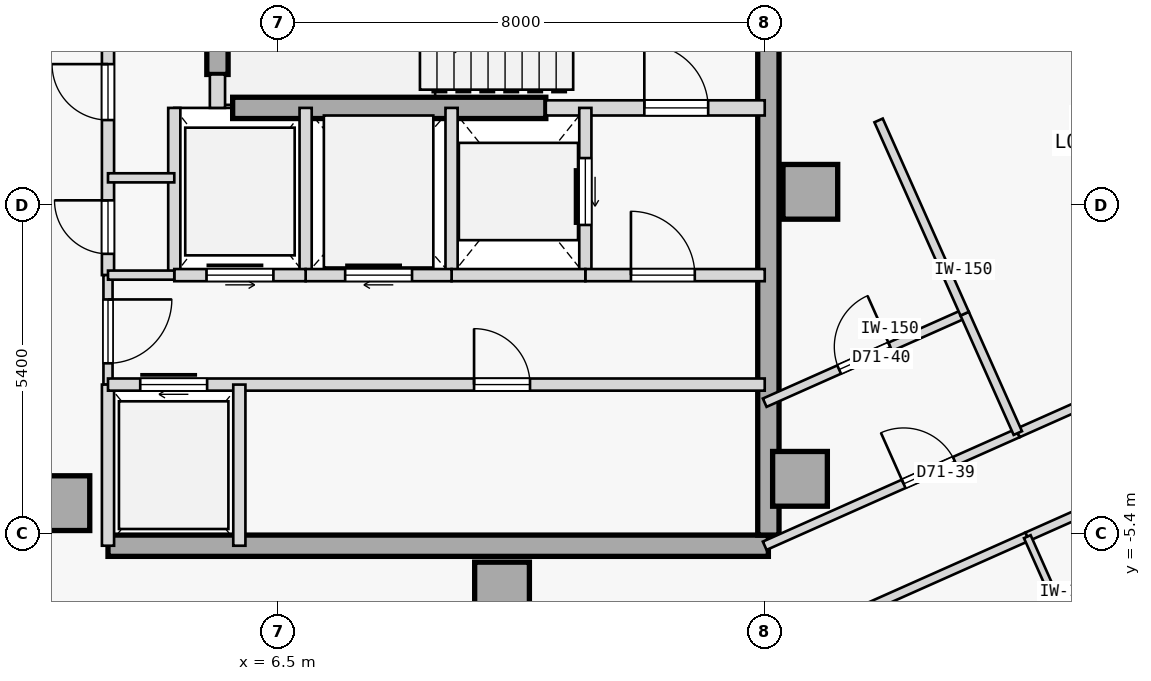
"""IFC4 building model, lengths in metres.
Left out: names, types, materials, properties, quantities, classifications, styles, units other than length and angle.
Written with IfcOpenShell. Run it as: python <this file> out.ifc"""

import sys

from ifc_helpers import new_model, si_unit, direction, frame, frame_2d, origin, origin_2d, place, context, subcontext, project, spatial, rectangle, extrude, element, fill, save


model = new_model("IFC4")
c1 = context("Model", 3, precision=1e-05, world=origin(), true_north=direction((0.0, 1.0)))
c2 = subcontext(c1, "Body", "Model", "MODEL_VIEW")
j1 = project(units=[si_unit("LENGTHUNIT", "METRE"), si_unit("PLANEANGLEUNIT", "RADIAN")], contexts=[c1])
p1 = place(None, origin())
s1 = spatial("IfcSite", under=j1, at=p1, CompositionType="ELEMENT")
p2 = place(p1, origin())
s2 = spatial("IfcBuilding", under=s1, at=p2, CompositionType="ELEMENT")
p3 = place(p2, frame((0.0, 0.0, 265.55)))
s3 = spatial("IfcBuildingStorey", under=s2, at=p3, CompositionType="ELEMENT", Elevation=265.55)
for number, where, z_axis, x_axis in (
    (1, (15.25, 0.22, 0.0), (0.0, 0.0, 1.0), (1.0, 0.0, 0.0)),
    (2, (15.08, -4.5, 0.0), (0.0, 0.0, 1.0), (1.0, 0.0, 0.0)),
    (3, (10.18, -6.32, 0.0), (0.0, 0.0, 1.0), (1.0, 0.0, 0.0)),
    (4, (2.95, -4.9, 0.0), (0.0, 0.0, 1.0), (1.0, 0.0, 0.0)),
):
    element("IfcColumn", number, at=place(p3, frame(where, z_axis=z_axis, x_axis=x_axis)), inside=s3, PredefinedType="COLUMN", context=c2, shape_type="SweptSolid", body=[
        extrude(rectangle(XDim=0.9, YDim=0.9, at=origin_2d()), origin(), (0.0, 0.0, 1.0), 3.35),
    ])
p4 = place(p3, frame((3.7, -5.6, 0.0), z_axis=(0.0, 0.0, 1.0), x_axis=(1.0, 0.0, 0.0)))
e5 = element("IfcWall", 5, at=p4, inside=s3, PredefinedType="SHEAR", context=c2, shape_type="SweptSolid", body=[
    extrude(rectangle(XDim=10.86, YDim=0.35, at=frame_2d((5.43, 0.0))), origin(), (0.0, 0.0, 1.0), 3.125),
])
p5 = place(p3, frame((14.56, -5.425, 0.0), z_axis=(0.0, 0.0, 1.0), x_axis=(0.0, 1.0, 0.0)))
e6 = element("IfcWall", 6, at=p5, inside=s3, PredefinedType="SHEAR", context=c2, shape_type="SweptSolid", body=[
    extrude(rectangle(XDim=10.85, YDim=0.35, at=frame_2d((5.425, 0.0))), origin(), (0.0, 0.0, 1.0), 3.125),
])
p6 = place(p3, frame((5.5, 2.15, 0.0), z_axis=(0.0, 0.0, 1.0), x_axis=(0.0, 1.0, 0.0)))
e7 = element("IfcWall", 7, at=p6, inside=s3, PredefinedType="SHEAR", context=c2, shape_type="SweptSolid", body=[
    extrude(rectangle(XDim=3.275, YDim=0.35, at=frame_2d((1.638, 0.0))), origin(), (0.0, 0.0, 1.0), 3.125),
])
p7 = place(p3, frame((5.75, 1.6, 0.0), z_axis=(0.0, 0.0, 1.0), x_axis=(1.0, 0.0, 0.0)))
e8 = element("IfcWall", 8, at=p7, inside=s3, PredefinedType="SHEAR", context=c2, shape_type="SweptSolid", body=[
    extrude(rectangle(XDim=5.15, YDim=0.35, at=frame_2d((2.575, 0.0))), origin(), (0.0, 0.0, 1.0), 3.125),
])
p8 = place(p3, frame((10.9, 1.6, 0.0), z_axis=(0.0, 0.0, 1.0), x_axis=(1.0, 0.0, 0.0)))
e9 = element("IfcWall", 9, at=p8, inside=s3, PredefinedType="STANDARD", context=c2, shape_type="SweptSolid", body=[
    extrude(rectangle(XDim=3.6, YDim=0.25, at=frame_2d((1.8, 0.0))), origin(), (0.0, 0.0, 1.0), 3.125),
])
p9 = place(p8, frame((1.62, 0.0, 0.0)))
e10 = element("IfcOpeningElement", 10, at=p9, cuts=e9, PredefinedType="OPENING", context=c2, shape_type="SweptSolid", body=[
    extrude(rectangle(XDim=1.05, YDim=2.15, at=frame_2d((0.525, 1.075))), frame((0.0, 0.135, 0.0), z_axis=(0.0, -1.0, 0.0), x_axis=(1.0, 0.0, 0.0)), (0.0, 0.0, 1.0), 0.27),
])
p10 = place(p3, frame((5.5, 1.6, 0.0), z_axis=(0.0, 0.0, 1.0), x_axis=(0.0, 1.0, 0.0)))
e11 = element("IfcWall", 11, at=p10, inside=s3, PredefinedType="STANDARD", context=c2, shape_type="SweptSolid", body=[
    extrude(rectangle(XDim=0.55, YDim=0.25, at=frame_2d((0.275, 0.0))), origin(), (0.0, 0.0, 1.0), 3.125),
])
p11 = place(p3, frame((3.7, -1.15, 0.0), z_axis=(0.0, 0.0, 1.0), x_axis=(0.0, 1.0, 0.0)))
e12 = element("IfcWall", 12, at=p11, inside=s3, PredefinedType="STANDARD", context=c2, shape_type="SweptSolid", body=[
    extrude(rectangle(XDim=6.75, YDim=0.2, at=frame_2d((3.375, 0.0))), origin(), (0.0, 0.0, 1.0), 3.125),
])
p12 = place(p11, frame((0.35, 0.0, 0.0)))
e13 = element("IfcOpeningElement", 13, at=p12, cuts=e12, PredefinedType="OPENING", context=c2, shape_type="SweptSolid", body=[
    extrude(rectangle(XDim=0.88, YDim=2.15, at=frame_2d((0.44, 1.075))), frame((0.0, 0.11, 0.0), z_axis=(0.0, -1.0, 0.0), x_axis=(1.0, 0.0, 0.0)), (0.0, 0.0, 1.0), 0.22),
])
p13 = place(p11, frame((2.55, 0.0, 0.0)))
e14 = element("IfcOpeningElement", 14, at=p13, cuts=e12, PredefinedType="OPENING", context=c2, shape_type="SweptSolid", body=[
    extrude(rectangle(XDim=0.92, YDim=2.15, at=frame_2d((0.46, 1.075))), frame((0.0, 0.11, 0.0), z_axis=(0.0, -1.0, 0.0), x_axis=(1.0, 0.0, 0.0)), (0.0, 0.0, 1.0), 0.22),
])
p14 = place(p11, frame((4.22, 0.0, 0.0)))
e15 = element("IfcOpeningElement", 15, at=p14, cuts=e12, PredefinedType="OPENING", context=c2, shape_type="SweptSolid", body=[
    extrude(rectangle(XDim=0.88, YDim=2.15, at=frame_2d((0.44, 1.075))), frame((0.0, 0.11, 0.0), z_axis=(0.0, -1.0, 0.0), x_axis=(1.0, 0.0, 0.0)), (0.0, 0.0, 1.0), 0.22),
])
p15 = place(p3, frame((3.7, -2.95, 0.0), z_axis=(0.0, 0.0, 1.0), x_axis=(0.0, 1.0, 0.0)))
e16 = element("IfcWall", 16, at=p15, inside=s3, PredefinedType="PARTITIONING", context=c2, shape_type="SweptSolid", body=[
    extrude(rectangle(XDim=1.8, YDim=0.15, at=frame_2d((0.9, 0.0))), origin(), (0.0, 0.0, 1.0), 3.125),
])
p16 = place(p15, frame((0.35, 0.0, 0.0)))
e17 = element("IfcOpeningElement", 17, at=p16, cuts=e16, PredefinedType="OPENING", context=c2, shape_type="SweptSolid", body=[
    extrude(rectangle(XDim=1.05, YDim=2.18, at=frame_2d((0.525, 1.09))), frame((0.0, 0.085, 0.0), z_axis=(0.0, -1.0, 0.0), x_axis=(1.0, 0.0, 0.0)), (0.0, 0.0, 1.0), 0.17),
])
p17 = place(p3, frame((3.7, -5.6, 0.0), z_axis=(0.0, 0.0, 1.0), x_axis=(0.0, 1.0, 0.0)))
e18 = element("IfcWall", 18, at=p17, inside=s3, PredefinedType="STANDARD", context=c2, shape_type="SweptSolid", body=[
    extrude(rectangle(XDim=2.65, YDim=0.2, at=frame_2d((1.325, 0.0))), origin(), (0.0, 0.0, 1.0), 3.125),
])
p18 = place(p3, frame((11.55, -1.15, 0.0), z_axis=(0.0, 0.0, 1.0), x_axis=(0.0, 1.0, 0.0)))
e19 = element("IfcWall", 19, at=p18, inside=s3, PredefinedType="STANDARD", context=c2, shape_type="SweptSolid", body=[
    extrude(rectangle(XDim=2.75, YDim=0.2, at=frame_2d((1.375, 0.0))), origin(), (0.0, 0.0, 1.0), 3.125),
])
p19 = place(p18, frame((0.825, 0.0, 0.0)))
e20 = element("IfcOpeningElement", 20, at=p19, cuts=e19, PredefinedType="OPENING", context=c2, shape_type="SweptSolid", body=[
    extrude(rectangle(XDim=1.1, YDim=2.15, at=frame_2d((0.55, 1.075))), frame((0.0, 0.11, 0.0), z_axis=(0.0, -1.0, 0.0), x_axis=(1.0, 0.0, 0.0)), (0.0, 0.0, 1.0), 0.22),
])
p20 = place(p3, frame((9.35, -1.15, 0.0), z_axis=(0.0, 0.0, 1.0), x_axis=(0.0, 1.0, 0.0)))
e21 = element("IfcWall", 21, at=p20, inside=s3, PredefinedType="STANDARD", context=c2, shape_type="SweptSolid", body=[
    extrude(rectangle(XDim=2.75, YDim=0.2, at=frame_2d((1.375, 0.0))), origin(), (0.0, 0.0, 1.0), 3.125),
])
p21 = place(p3, frame((11.55, -1.15, 0.0), z_axis=(0.0, 0.0, 1.0), x_axis=(1.0, 0.0, 0.0)))
e22 = element("IfcWall", 22, at=p21, inside=s3, PredefinedType="STANDARD", context=c2, shape_type="SweptSolid", body=[
    extrude(rectangle(XDim=2.95, YDim=0.2, at=frame_2d((1.475, 0.0))), origin(), (0.0, 0.0, 1.0), 3.125),
])
p22 = place(p21, frame((0.75, 0.0, 0.0)))
e23 = element("IfcOpeningElement", 23, at=p22, cuts=e22, PredefinedType="OPENING", context=c2, shape_type="SweptSolid", body=[
    extrude(rectangle(XDim=1.05, YDim=2.18, at=frame_2d((0.525, 1.09))), frame((0.0, 0.11, 0.0), z_axis=(0.0, -1.0, 0.0), x_axis=(1.0, 0.0, 0.0)), (0.0, 0.0, 1.0), 0.22),
])
p23 = place(p3, frame((9.35, -1.15, 0.0), z_axis=(0.0, 0.0, 1.0), x_axis=(1.0, 0.0, 0.0)))
e24 = element("IfcWall", 24, at=p23, inside=s3, PredefinedType="STANDARD", context=c2, shape_type="SweptSolid", body=[
    extrude(rectangle(XDim=2.2, YDim=0.2, at=frame_2d((1.1, 0.0))), origin(), (0.0, 0.0, 1.0), 3.125),
])
p24 = place(p3, frame((6.95, -1.15, 0.0), z_axis=(0.0, 0.0, 1.0), x_axis=(0.0, 1.0, 0.0)))
e25 = element("IfcWall", 25, at=p24, inside=s3, PredefinedType="STANDARD", context=c2, shape_type="SweptSolid", body=[
    extrude(rectangle(XDim=2.75, YDim=0.2, at=frame_2d((1.375, 0.0))), origin(), (0.0, 0.0, 1.0), 3.125),
])
p25 = place(p3, frame((6.95, -1.15, 0.0), z_axis=(0.0, 0.0, 1.0), x_axis=(1.0, 0.0, 0.0)))
e26 = element("IfcWall", 26, at=p25, inside=s3, PredefinedType="STANDARD", context=c2, shape_type="SweptSolid", body=[
    extrude(rectangle(XDim=2.4, YDim=0.2, at=frame_2d((1.2, 0.0))), origin(), (0.0, 0.0, 1.0), 3.125),
])
p26 = place(p25, frame((0.65, 0.0, 0.0)))
e27 = element("IfcOpeningElement", 27, at=p26, cuts=e26, PredefinedType="OPENING", context=c2, shape_type="SweptSolid", body=[
    extrude(rectangle(XDim=1.1, YDim=2.15, at=frame_2d((0.55, 1.075))), frame((0.0, 0.11, 0.0), z_axis=(0.0, -1.0, 0.0), x_axis=(1.0, 0.0, 0.0)), (0.0, 0.0, 1.0), 0.22),
])
p27 = place(p3, frame((4.79, -1.15, 0.0), z_axis=(0.0, 0.0, 1.0), x_axis=(0.0, 1.0, 0.0)))
e28 = element("IfcWall", 28, at=p27, inside=s3, PredefinedType="STANDARD", context=c2, shape_type="SweptSolid", body=[
    extrude(rectangle(XDim=2.75, YDim=0.2, at=frame_2d((1.375, 0.0))), origin(), (0.0, 0.0, 1.0), 3.125),
])
p28 = place(p3, frame((4.79, -1.15, 0.0), z_axis=(0.0, 0.0, 1.0), x_axis=(1.0, 0.0, 0.0)))
e29 = element("IfcWall", 29, at=p28, inside=s3, PredefinedType="STANDARD", context=c2, shape_type="SweptSolid", body=[
    extrude(rectangle(XDim=2.16, YDim=0.2, at=frame_2d((1.08, 0.0))), origin(), (0.0, 0.0, 1.0), 3.125),
])
p29 = place(p28, frame((0.53, 0.0, 0.0)))
e30 = element("IfcOpeningElement", 30, at=p29, cuts=e29, PredefinedType="OPENING", context=c2, shape_type="SweptSolid", body=[
    extrude(rectangle(XDim=1.1, YDim=2.15, at=frame_2d((0.55, 1.075))), frame((0.0, 0.11, 0.0), z_axis=(0.0, -1.0, 0.0), x_axis=(1.0, 0.0, 0.0)), (0.0, 0.0, 1.0), 0.22),
])
p30 = place(p3, frame((3.7, -1.15, 0.0), z_axis=(0.0, 0.0, 1.0), x_axis=(1.0, 0.0, 0.0)))
e31 = element("IfcWall", 31, at=p30, inside=s3, PredefinedType="PARTITIONING", context=c2, shape_type="SweptSolid", body=[
    extrude(rectangle(XDim=1.09, YDim=0.15, at=frame_2d((0.545, 0.0))), origin(), (0.0, 0.0, 1.0), 3.125),
])
p31 = place(p3, frame((3.7, -2.95, 0.0), z_axis=(0.0, 0.0, 1.0), x_axis=(1.0, 0.0, 0.0)))
e32 = element("IfcWall", 32, at=p31, inside=s3, PredefinedType="STANDARD", context=c2, shape_type="SweptSolid", body=[
    extrude(rectangle(XDim=10.8, YDim=0.2, at=frame_2d((5.4, 0.0))), origin(), (0.0, 0.0, 1.0), 3.125),
])
p32 = place(p31, frame((0.53, 0.0, 0.0)))
e33 = element("IfcOpeningElement", 33, at=p32, cuts=e32, PredefinedType="OPENING", context=c2, shape_type="SweptSolid", body=[
    extrude(rectangle(XDim=1.1, YDim=2.15, at=frame_2d((0.55, 1.075))), frame((0.0, 0.11, 0.0), z_axis=(0.0, -1.0, 0.0), x_axis=(1.0, 0.0, 0.0)), (0.0, 0.0, 1.0), 0.22),
])
p33 = place(p31, frame((6.02, 0.0, 0.0)))
e34 = element("IfcOpeningElement", 34, at=p33, cuts=e32, PredefinedType="OPENING", context=c2, shape_type="SweptSolid", body=[
    extrude(rectangle(XDim=0.92, YDim=2.15, at=frame_2d((0.46, 1.075))), frame((0.0, 0.11, 0.0), z_axis=(0.0, -1.0, 0.0), x_axis=(1.0, 0.0, 0.0)), (0.0, 0.0, 1.0), 0.22),
])
p34 = place(p3, frame((5.86, -5.6, 0.0), z_axis=(0.0, 0.0, 1.0), x_axis=(0.0, 1.0, 0.0)))
e35 = element("IfcWall", 35, at=p34, inside=s3, PredefinedType="STANDARD", context=c2, shape_type="SweptSolid", body=[
    extrude(rectangle(XDim=2.65, YDim=0.2, at=frame_2d((1.325, 0.0))), origin(), (0.0, 0.0, 1.0), 3.125),
])
p35 = place(p3, frame((3.7, 0.45, 0.0), z_axis=(0.0, 0.0, 1.0), x_axis=(1.0, 0.0, 0.0)))
e36 = element("IfcWall", 36, at=p35, inside=s3, PredefinedType="PARTITIONING", context=c2, shape_type="SweptSolid", body=[
    extrude(rectangle(XDim=1.09, YDim=0.15, at=frame_2d((0.545, 0.0))), origin(), (0.0, 0.0, 1.0), 3.125),
])
p36 = place(p3, frame((14.844, -7.22, 0.0), z_axis=(0.0, 0.0, 1.0), x_axis=(0.913524337797, 0.406784075711, 0.0)))
e37 = element("IfcWall", 37, at=p36, inside=s3, PredefinedType="PARTITIONING", context=c2, shape_type="SweptSolid", body=[
    extrude(rectangle(XDim=4.35, YDim=0.15, at=frame_2d((2.175, 0.0))), origin(), (0.0, 0.0, 1.0), 3.125),
])
p37 = place(p3, frame((18.818, -5.451, 0.0), z_axis=(0.0, 0.0, 1.0), x_axis=(0.913538066796, 0.406753242783, 0.0)))
e38 = element("IfcWall", 38, at=p37, inside=s3, PredefinedType="PARTITIONING", context=c2, shape_type="SweptSolid", body=[
    extrude(rectangle(XDim=3.5, YDim=0.15, at=frame_2d((1.75, 0.0))), origin(), (0.0, 0.0, 1.0), 3.125),
])
p38 = place(p3, frame((14.5, -5.6, 0.0), z_axis=(0.0, 0.0, 1.0), x_axis=(0.913550607208, 0.406725076766, 0.0)))
e39 = element("IfcWall", 39, at=p38, inside=s3, PredefinedType="PARTITIONING", context=c2, shape_type="SweptSolid", body=[
    extrude(rectangle(XDim=4.556, YDim=0.15, at=frame_2d((2.278, 0.0))), origin(), (0.0, 0.0, 1.0), 3.125),
])
p39 = place(p38, frame((2.501, 0.0, 0.0)))
e40 = element("IfcOpeningElement", 40, at=p39, cuts=e39, PredefinedType="OPENING", context=c2, shape_type="SweptSolid", body=[
    extrude(rectangle(XDim=0.92, YDim=2.15, at=frame_2d((0.46, 1.075))), frame((0.0, 0.085, 0.0), z_axis=(0.0, -1.0, 0.0), x_axis=(1.0, 0.0, 0.0)), (0.0, 0.0, 1.0), 0.17),
])
p40 = place(p3, frame((18.662, -3.747, 0.0), z_axis=(0.0, 0.0, 1.0), x_axis=(0.913544622417, 0.406738519018, 0.0)))
e41 = element("IfcWall", 41, at=p40, inside=s3, PredefinedType="PARTITIONING", context=c2, shape_type="SweptSolid", body=[
    extrude(rectangle(XDim=14.192, YDim=0.15, at=frame_2d((7.096, 0.0))), origin(), (0.0, 0.0, 1.0), 3.125),
])
p41 = place(p40, frame((6.636, 0.0, 0.0)))
e42 = element("IfcOpeningElement", 42, at=p41, cuts=e41, PredefinedType="OPENING", context=c2, shape_type="SweptSolid", body=[
    extrude(rectangle(XDim=0.92, YDim=2.15, at=frame_2d((0.46, 1.075))), frame((0.0, 0.085, 0.0), z_axis=(0.0, -1.0, 0.0), x_axis=(1.0, 0.0, 0.0)), (0.0, 0.0, 1.0), 0.17),
])
p42 = place(p3, frame((19.713, -7.461, 0.0), z_axis=(0.0, 0.0, 1.0), x_axis=(-0.406684063321, 0.913568865845, 0.0)))
e43 = element("IfcWall", 43, at=p42, inside=s3, PredefinedType="PARTITIONING", context=c2, shape_type="SweptSolid", body=[
    extrude(rectangle(XDim=2.2, YDim=0.12, at=frame_2d((1.1, 0.0))), origin(), (0.0, 0.0, 1.0), 3.125),
])
p43 = place(p3, frame((14.5, -3.248, 0.0), z_axis=(0.0, 0.0, 1.0), x_axis=(0.913542803573, 0.40674260416, 0.0)))
e44 = element("IfcWall", 44, at=p43, inside=s3, PredefinedType="PARTITIONING", context=c2, shape_type="SweptSolid", body=[
    extrude(rectangle(XDim=3.599, YDim=0.15, at=frame_2d((1.8, 0.0))), origin(), (0.0, 0.0, 1.0), 3.125),
])
p44 = place(p43, frame((1.34, 0.0, 0.0)))
e45 = element("IfcOpeningElement", 45, at=p44, cuts=e44, PredefinedType="OPENING", context=c2, shape_type="SweptSolid", body=[
    extrude(rectangle(XDim=0.92, YDim=2.15, at=frame_2d((0.46, 1.075))), frame((0.0, 0.085, 0.0), z_axis=(0.0, -1.0, 0.0), x_axis=(1.0, 0.0, 0.0)), (0.0, 0.0, 1.0), 0.17),
])
p45 = place(p3, frame((18.662, -3.747, 0.0), z_axis=(0.0, 0.0, 1.0), x_axis=(-0.406686481677, 0.913567789286, 0.0)))
e46 = element("IfcWall", 46, at=p45, inside=s3, PredefinedType="PARTITIONING", context=c2, shape_type="SweptSolid", body=[
    extrude(rectangle(XDim=2.149, YDim=0.15, at=frame_2d((1.075, 0.0))), origin(), (0.0, 0.0, 1.0), 3.125),
])
p46 = place(p3, frame((17.788, -1.784, 0.0), z_axis=(0.0, 0.0, 1.0), x_axis=(-0.40673740295, 0.913545119324, 0.0)))
e47 = element("IfcWall", 47, at=p46, inside=s3, PredefinedType="PARTITIONING", context=c2, shape_type="SweptSolid", body=[
    extrude(rectangle(XDim=3.479, YDim=0.15, at=frame_2d((1.74, 0.0))), origin(), (0.0, 0.0, 1.0), 3.125),
])
p47 = place(p9, origin())
e48 = element("IfcDoor", 48, at=p47, inside=s3, OperationType="SINGLE_SWING_LEFT", PredefinedType="DOOR", context=c2, shape_type="SweptSolid", body=[
    extrude(rectangle(XDim=1.05, YDim=2.15, at=frame_2d((0.525, 1.075))), frame((0.0, 0.025, 0.0), z_axis=(0.0, -1.0, 0.0), x_axis=(1.0, 0.0, 0.0)), (0.0, 0.0, 1.0), 0.05),
])
fill(e10, e48)
p48 = place(p22, origin())
e49 = element("IfcDoor", 49, at=p48, inside=s3, OperationType="SINGLE_SWING_LEFT", PredefinedType="DOOR", context=c2, shape_type="SweptSolid", body=[
    extrude(rectangle(XDim=1.05, YDim=2.18, at=frame_2d((0.525, 1.09))), frame((0.0, 0.025, 0.0), z_axis=(0.0, -1.0, 0.0), x_axis=(1.0, 0.0, 0.0)), (0.0, 0.0, 1.0), 0.05),
])
fill(e23, e49)
p49 = place(p16, frame((1.05, 0.0, 0.0), z_axis=(0.0, 0.0, 1.0), x_axis=(-1.0, 0.0, 0.0)))
e50 = element("IfcDoor", 50, at=p49, inside=s3, OperationType="SINGLE_SWING_RIGHT", PredefinedType="DOOR", context=c2, shape_type="SweptSolid", body=[
    extrude(rectangle(XDim=1.05, YDim=2.18, at=frame_2d((0.525, 1.09))), frame((0.0, 0.025, 0.0), z_axis=(0.0, -1.0, 0.0), x_axis=(1.0, 0.0, 0.0)), (0.0, 0.0, 1.0), 0.05),
])
fill(e17, e50)
p50 = place(p19, origin())
e51 = element("IfcDoor", 51, at=p50, inside=s3, OperationType="SLIDING_TO_RIGHT", PredefinedType="DOOR", context=c2, shape_type="SweptSolid", body=[
    extrude(rectangle(XDim=1.1, YDim=2.15, at=frame_2d((0.55, 1.075))), frame((0.0, 0.025, 0.0), z_axis=(0.0, -1.0, 0.0), x_axis=(1.0, 0.0, 0.0)), (0.0, 0.0, 1.0), 0.05),
])
fill(e20, e51)
p51 = place(p26, origin())
e52 = element("IfcDoor", 52, at=p51, inside=s3, OperationType="SLIDING_TO_RIGHT", PredefinedType="DOOR", context=c2, shape_type="SweptSolid", body=[
    extrude(rectangle(XDim=1.1, YDim=2.15, at=frame_2d((0.55, 1.075))), frame((0.0, 0.025, 0.0), z_axis=(0.0, -1.0, 0.0), x_axis=(1.0, 0.0, 0.0)), (0.0, 0.0, 1.0), 0.05),
])
fill(e27, e52)
p52 = place(p29, origin())
e53 = element("IfcDoor", 53, at=p52, inside=s3, OperationType="SLIDING_TO_LEFT", PredefinedType="DOOR", context=c2, shape_type="SweptSolid", body=[
    extrude(rectangle(XDim=1.1, YDim=2.15, at=frame_2d((0.55, 1.075))), frame((0.0, 0.025, 0.0), z_axis=(0.0, -1.0, 0.0), x_axis=(1.0, 0.0, 0.0)), (0.0, 0.0, 1.0), 0.05),
])
fill(e30, e53)
p53 = place(p32, origin())
e54 = element("IfcDoor", 54, at=p53, inside=s3, OperationType="SLIDING_TO_RIGHT", PredefinedType="DOOR", context=c2, shape_type="SweptSolid", body=[
    extrude(rectangle(XDim=1.1, YDim=2.15, at=frame_2d((0.55, 1.075))), frame((0.0, 0.025, 0.0), z_axis=(0.0, -1.0, 0.0), x_axis=(1.0, 0.0, 0.0)), (0.0, 0.0, 1.0), 0.05),
])
fill(e33, e54)
p54 = place(p33, origin())
e55 = element("IfcDoor", 55, at=p54, inside=s3, OperationType="SINGLE_SWING_LEFT", PredefinedType="DOOR", context=c2, shape_type="SweptSolid", body=[
    extrude(rectangle(XDim=0.92, YDim=2.15, at=frame_2d((0.46, 1.075))), frame((0.0, 0.025, 0.0), z_axis=(0.0, -1.0, 0.0), x_axis=(1.0, 0.0, 0.0)), (0.0, 0.0, 1.0), 0.05),
])
fill(e34, e55)
p55 = place(p12, origin())
e56 = element("IfcDoor", 56, at=p55, inside=s3, OperationType="SINGLE_SWING_RIGHT", PredefinedType="DOOR", context=c2, shape_type="SweptSolid", body=[
    extrude(rectangle(XDim=0.88, YDim=2.15, at=frame_2d((0.44, 1.075))), frame((0.0, 0.025, 0.0), z_axis=(0.0, -1.0, 0.0), x_axis=(1.0, 0.0, 0.0)), (0.0, 0.0, 1.0), 0.05),
])
fill(e13, e56)
p56 = place(p13, origin())
e57 = element("IfcDoor", 57, at=p56, inside=s3, OperationType="SINGLE_SWING_RIGHT", PredefinedType="DOOR", context=c2, shape_type="SweptSolid", body=[
    extrude(rectangle(XDim=0.92, YDim=2.15, at=frame_2d((0.46, 1.075))), frame((0.0, 0.025, 0.0), z_axis=(0.0, -1.0, 0.0), x_axis=(1.0, 0.0, 0.0)), (0.0, 0.0, 1.0), 0.05),
])
fill(e14, e57)
p57 = place(p39, origin())
e58 = element("IfcDoor", 58, at=p57, inside=s3, OperationType="SINGLE_SWING_LEFT", PredefinedType="DOOR", context=c2, shape_type="SweptSolid", body=[
    extrude(rectangle(XDim=0.92, YDim=2.15, at=frame_2d((0.46, 1.075))), frame((0.0, 0.025, 0.0), z_axis=(0.0, -1.0, 0.0), x_axis=(1.0, 0.0, 0.0)), (0.0, 0.0, 1.0), 0.05),
])
fill(e40, e58)
p58 = place(p44, origin())
e59 = element("IfcDoor", 59, at=p58, inside=s3, OperationType="SINGLE_SWING_RIGHT", PredefinedType="DOOR", context=c2, shape_type="SweptSolid", body=[
    extrude(rectangle(XDim=0.92, YDim=2.15, at=frame_2d((0.46, 1.075))), frame((0.0, 0.025, 0.0), z_axis=(0.0, -1.0, 0.0), x_axis=(1.0, 0.0, 0.0)), (0.0, 0.0, 1.0), 0.05),
])
fill(e45, e59)
save(model, sys.argv[1])
